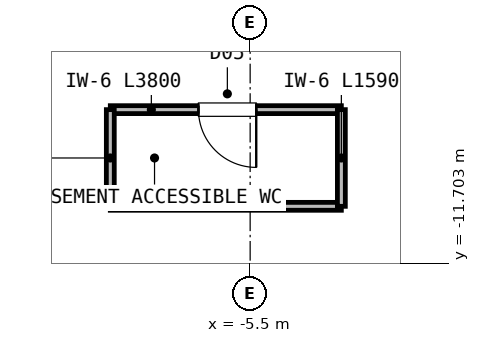
"""IFC4 building model, lengths in metres.
Left out: names, types, materials, properties, quantities, classifications, styles, units other than length and angle.
Written with IfcOpenShell. Run it as: python <this file> out.ifc"""

import sys

from ifc_helpers import new_model, si_unit, direction, frame, frame_2d, origin, place, context, subcontext, project, spatial, rectangle, extrude, element, fill, save


model = new_model("IFC4")
c1 = context("Model", 3, precision=1e-05, world=origin(), true_north=direction((0.0, 1.0)))
c2 = subcontext(c1, "Body", "Model", "MODEL_VIEW")
j1 = project(units=[si_unit("LENGTHUNIT", "METRE"), si_unit("PLANEANGLEUNIT", "RADIAN")], contexts=[c1])
p1 = place(None, origin())
s1 = spatial("IfcSite", under=j1, at=p1, CompositionType="ELEMENT")
p2 = place(p1, origin())
s2 = spatial("IfcBuilding", under=s1, at=p2, CompositionType="ELEMENT")
p3 = place(p2, frame((0.0, 0.0, -4.5)))
s3 = spatial("IfcBuildingStorey", under=s2, at=p3, CompositionType="ELEMENT", Elevation=-4.5)
p4 = place(p3, frame((-4.0, -9.18, 0.0), z_axis=(0.0, 0.0, 1.0), x_axis=(-1.0, 0.0, 0.0)))
e1 = element("IfcWall", 1, at=p4, inside=s3, PredefinedType="PARTITIONING", context=c2, shape_type="SweptSolid", body=[
    extrude(rectangle(XDim=3.8, YDim=0.13, at=frame_2d((1.9, 0.0))), origin(), (0.0, 0.0, 1.0), 3.0),
])
p5 = place(p4, frame((1.4, 0.0, 0.0)))
e2 = element("IfcOpeningElement", 2, at=p5, cuts=e1, PredefinedType="OPENING", context=c2, shape_type="SweptSolid", body=[
    extrude(rectangle(XDim=0.95, YDim=2.1, at=frame_2d((0.475, 1.05))), frame((0.0, 0.075, 0.0), z_axis=(0.0, -1.0, 0.0), x_axis=(1.0, 0.0, 0.0)), (0.0, 0.0, 1.0), 0.15),
])
p6 = place(p3, frame((-7.8, -10.77, 0.0), z_axis=(0.0, 0.0, 1.0), x_axis=(1.0, 0.0, 0.0)))
e3 = element("IfcWall", 3, at=p6, inside=s3, PredefinedType="PARTITIONING", context=c2, shape_type="SweptSolid", body=[
    extrude(rectangle(XDim=3.8, YDim=0.13, at=frame_2d((1.9, 0.0))), origin(), (0.0, 0.0, 1.0), 4.22),
])
for number, where, z_axis, x_axis in (
    (4, (-7.8, -10.77, 0.0), (0.0, 0.0, 1.0), (0.0, 1.0, 0.0)),
    (5, (-4.0, -10.77, 0.0), (0.0, 0.0, 1.0), (0.0, 1.0, 0.0)),
):
    element("IfcWall", number, at=place(p3, frame(where, z_axis=z_axis, x_axis=x_axis)), inside=s3, PredefinedType="PARTITIONING", context=c2, shape_type="SweptSolid", body=[
        extrude(rectangle(XDim=1.59, YDim=0.13, at=frame_2d((0.795, 0.0))), origin(), (0.0, 0.0, 1.0), 4.22),
    ])
p7 = place(p5, origin())
e6 = element("IfcDoor", 6, at=p7, inside=s3, OperationType="SINGLE_SWING_LEFT", PredefinedType="DOOR", context=c2, shape_type="SweptSolid", body=[
    extrude(rectangle(XDim=0.95, YDim=2.1, at=frame_2d((0.475, 1.05))), frame((0.0, 0.025, 0.0), z_axis=(0.0, -1.0, 0.0), x_axis=(1.0, 0.0, 0.0)), (0.0, 0.0, 1.0), 0.05),
])
fill(e2, e6)
save(model, sys.argv[1])
